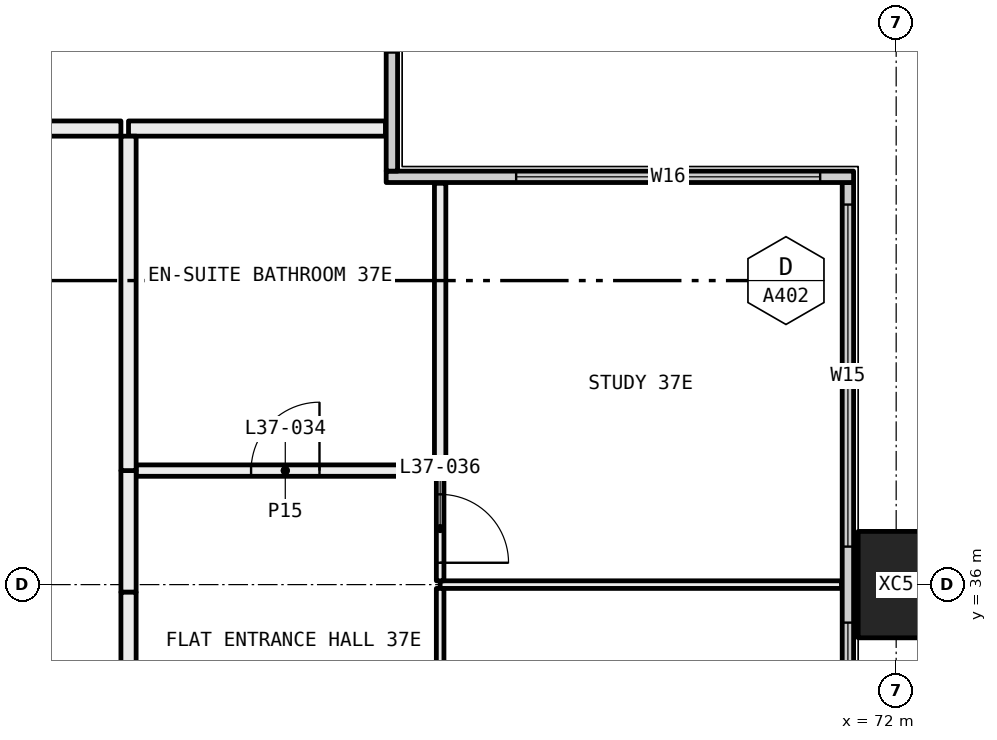
"""IFC4 building model, lengths in metres.
Left out: names, types, materials, properties, quantities, classifications, styles, units other than length and angle.
Written with IfcOpenShell. Run it as: python <this file> out.ifc"""

import sys

from ifc_helpers import new_model, si_unit, direction, frame, frame_2d, origin, origin_2d, place, context, subcontext, project, spatial, rectangle, hollow_rectangle, extrude, element, fill, save


model = new_model("IFC4")
c1 = context("Model", 3, precision=1e-05, world=origin(), true_north=direction((0.0, 1.0)))
c2 = subcontext(c1, "Body", "Model", "MODEL_VIEW")
j1 = project(units=[si_unit("LENGTHUNIT", "METRE"), si_unit("PLANEANGLEUNIT", "RADIAN")], contexts=[c1])
p1 = place(None, origin())
s1 = spatial("IfcSite", under=j1, at=p1, CompositionType="ELEMENT")
p2 = place(p1, origin())
s2 = spatial("IfcBuilding", under=s1, at=p2, CompositionType="ELEMENT")
p3 = place(p2, frame((0.0, 0.0, 141.45)))
s3 = spatial("IfcBuildingStorey", under=s2, at=p3, CompositionType="ELEMENT", Elevation=141.45)
p4 = place(p3, frame((72.0, 36.0, -0.4), z_axis=(0.0, 0.0, 1.0), x_axis=(0.0, 1.0, 0.0)))
e1 = element("IfcColumn", 1, at=p4, inside=s3, PredefinedType="COLUMN", context=c2, shape_type="SweptSolid", body=[
    extrude(hollow_rectangle(XDim=1.4, YDim=1.0, WallThickness=0.055, at=origin_2d()), origin(), (0.0, 0.0, 1.0), 3.45),
])
p5 = place(p3, frame((71.365, 18.71, 0.0), z_axis=(0.0, 0.0, 1.0), x_axis=(0.0, 1.0, 0.0)))
e2 = element("IfcWall", 2, at=p5, inside=s3, PredefinedType="ELEMENTEDWALL", context=c2, shape_type="SweptSolid", body=[
    extrude(rectangle(XDim=22.58, YDim=0.15, at=frame_2d((11.29, 0.0))), origin(), (0.0, 0.0, 1.0), 3.05),
])
p6 = place(p5, frame((0.29, 0.0, 0.45)))
e3 = element("IfcOpeningElement", 3, at=p6, cuts=e2, PredefinedType="OPENING", context=c2, shape_type="SweptSolid", body=[
    extrude(rectangle(XDim=4.5, YDim=2.55, at=frame_2d((2.25, 1.275))), frame((0.0, 0.085, 0.0), z_axis=(0.0, -1.0, 0.0), x_axis=(1.0, 0.0, 0.0)), (0.0, 0.0, 1.0), 0.17),
])
p7 = place(p5, frame((5.79, 0.0, 0.45)))
e4 = element("IfcOpeningElement", 4, at=p7, cuts=e2, PredefinedType="OPENING", context=c2, shape_type="SweptSolid", body=[
    extrude(rectangle(XDim=3.75, YDim=2.55, at=frame_2d((1.875, 1.275))), frame((0.0, 0.085, 0.0), z_axis=(0.0, -1.0, 0.0), x_axis=(1.0, 0.0, 0.0)), (0.0, 0.0, 1.0), 0.17),
])
p8 = place(p5, frame((13.04, 0.0, 0.45)))
e5 = element("IfcOpeningElement", 5, at=p8, cuts=e2, PredefinedType="OPENING", context=c2, shape_type="SweptSolid", body=[
    extrude(rectangle(XDim=0.75, YDim=2.55, at=frame_2d((0.375, 1.275))), frame((0.0, 0.085, 0.0), z_axis=(0.0, -1.0, 0.0), x_axis=(1.0, 0.0, 0.0)), (0.0, 0.0, 1.0), 0.17),
])
p9 = place(p5, frame((14.79, 0.0, 0.45)))
e6 = element("IfcOpeningElement", 6, at=p9, cuts=e2, PredefinedType="OPENING", context=c2, shape_type="SweptSolid", body=[
    extrude(rectangle(XDim=2.0, YDim=2.55, at=frame_2d((1.0, 1.275))), frame((0.0, 0.085, 0.0), z_axis=(0.0, -1.0, 0.0), x_axis=(1.0, 0.0, 0.0)), (0.0, 0.0, 1.0), 0.17),
])
p10 = place(p5, frame((17.79, 0.0, 0.45)))
e7 = element("IfcOpeningElement", 7, at=p10, cuts=e2, PredefinedType="OPENING", context=c2, shape_type="SweptSolid", body=[
    extrude(rectangle(XDim=4.5, YDim=2.55, at=frame_2d((2.25, 1.275))), frame((0.0, 0.085, 0.0), z_axis=(0.0, -1.0, 0.0), x_axis=(1.0, 0.0, 0.0)), (0.0, 0.0, 1.0), 0.17),
])
p11 = place(p3, frame((65.29, 41.365, 0.0), z_axis=(0.0, 0.0, 1.0), x_axis=(1.0, 0.0, 0.0)))
e8 = element("IfcWall", 8, at=p11, inside=s3, PredefinedType="ELEMENTEDWALL", context=c2, shape_type="SweptSolid", body=[
    extrude(rectangle(XDim=6.15, YDim=0.15, at=frame_2d((3.075, 0.0))), origin(), (0.0, 0.0, 1.0), 3.05),
])
p12 = place(p11, frame((1.71, 0.0, 0.45)))
e9 = element("IfcOpeningElement", 9, at=p12, cuts=e8, PredefinedType="OPENING", context=c2, shape_type="SweptSolid", body=[
    extrude(rectangle(XDim=4.0, YDim=2.55, at=frame_2d((2.0, 1.275))), frame((0.0, 0.085, 0.0), z_axis=(0.0, -1.0, 0.0), x_axis=(1.0, 0.0, 0.0)), (0.0, 0.0, 1.0), 0.17),
])
p13 = place(p3, frame((65.365, 41.44, 0.0), z_axis=(0.0, 0.0, 1.0), x_axis=(0.0, 1.0, 0.0)))
e10 = element("IfcWall", 10, at=p13, inside=s3, PredefinedType="ELEMENTEDWALL", context=c2, shape_type="SweptSolid", body=[
    extrude(rectangle(XDim=5.85, YDim=0.15, at=frame_2d((2.925, 0.0))), origin(), (0.0, 0.0, 1.0), 3.05),
])
p14 = place(p13, frame((1.56, 0.0, 0.45)))
e11 = element("IfcOpeningElement", 11, at=p14, cuts=e10, PredefinedType="OPENING", context=c2, shape_type="SweptSolid", body=[
    extrude(rectangle(XDim=4.0, YDim=2.55, at=frame_2d((2.0, 1.275))), frame((0.0, 0.085, 0.0), z_axis=(0.0, -1.0, 0.0), x_axis=(1.0, 0.0, 0.0)), (0.0, 0.0, 1.0), 0.17),
])
p15 = place(p3, frame((71.28, 36.0, 0.0), z_axis=(0.0, 0.0, 1.0), x_axis=(-1.0, 0.0, 0.0)))
e12 = element("IfcWall", 12, at=p15, inside=s3, PredefinedType="PARTITIONING", context=c2, shape_type="SweptSolid", body=[
    extrude(rectangle(XDim=5.28, YDim=0.1, at=frame_2d((2.64, 0.0))), origin(), (0.0, 0.0, 1.0), 2.45),
])
p16 = place(p3, frame((66.0, 35.95, 0.0), z_axis=(0.0, 0.0, 1.0), x_axis=(0.0, -1.0, 0.0)))
e13 = element("IfcWall", 13, at=p16, inside=s3, PredefinedType="PARTITIONING", context=c2, shape_type="SweptSolid", body=[
    extrude(rectangle(XDim=2.95, YDim=0.1, at=frame_2d((1.475, 0.0))), origin(), (0.0, 0.0, 1.0), 2.45),
])
p17 = place(p3, frame((66.0, 37.425, 0.0), z_axis=(0.0, 0.0, 1.0), x_axis=(0.0, -1.0, 0.0)))
e14 = element("IfcWall", 14, at=p17, inside=s3, PredefinedType="PARTITIONING", context=c2, shape_type="SweptSolid", body=[
    extrude(rectangle(XDim=1.375, YDim=0.1, at=frame_2d((0.688, 0.0))), origin(), (0.0, 0.0, 1.0), 2.45),
])
p18 = place(p17, frame((0.238, 0.0, 0.0)))
e15 = element("IfcOpeningElement", 15, at=p18, cuts=e14, PredefinedType="OPENING", context=c2, shape_type="SweptSolid", body=[
    extrude(rectangle(XDim=0.9, YDim=2.1, at=frame_2d((0.45, 1.05))), frame((0.0, 0.06, 0.0), z_axis=(0.0, -1.0, 0.0), x_axis=(1.0, 0.0, 0.0)), (0.0, 0.0, 1.0), 0.12),
])
p19 = place(p3, frame((66.0, 41.28, 0.0), z_axis=(0.0, 0.0, 1.0), x_axis=(0.0, -1.0, 0.0)))
e16 = element("IfcWall", 16, at=p19, inside=s3, PredefinedType="PARTITIONING", context=c2, shape_type="SweptSolid", body=[
    extrude(rectangle(XDim=3.78, YDim=0.15, at=frame_2d((1.89, 0.0))), origin(), (0.0, 0.0, 1.0), 3.05),
])
p20 = place(p3, frame((65.925, 37.5, 0.0), z_axis=(0.0, 0.0, 1.0), x_axis=(-1.0, 0.0, 0.0)))
e17 = element("IfcWall", 17, at=p20, inside=s3, PredefinedType="PARTITIONING", context=c2, shape_type="SweptSolid", body=[
    extrude(rectangle(XDim=3.925, YDim=0.15, at=frame_2d((1.962, 0.0))), origin(), (0.0, 0.0, 1.0), 3.05),
])
p21 = place(p20, frame((1.512, 0.0, 0.0)))
e18 = element("IfcOpeningElement", 18, at=p21, cuts=e17, PredefinedType="OPENING", context=c2, shape_type="SweptSolid", body=[
    extrude(rectangle(XDim=0.9, YDim=2.1, at=frame_2d((0.45, 1.05))), frame((0.0, 0.085, 0.0), z_axis=(0.0, -1.0, 0.0), x_axis=(1.0, 0.0, 0.0)), (0.0, 0.0, 1.0), 0.17),
])
p22 = place(p3, frame((61.9, 37.5, 0.0), z_axis=(0.0, 0.0, 1.0), x_axis=(0.0, -1.0, 0.0)))
e19 = element("IfcWall", 19, at=p22, inside=s3, PredefinedType="PARTITIONING", context=c2, shape_type="SweptSolid", body=[
    extrude(rectangle(XDim=1.6, YDim=0.2, at=frame_2d((0.8, 0.0))), origin(), (0.0, 0.0, 1.0), 2.45),
])
p23 = place(p3, frame((61.9, 35.9, 0.0), z_axis=(0.0, 0.0, 1.0), x_axis=(0.0, -1.0, 0.0)))
e20 = element("IfcWall", 20, at=p23, inside=s3, PredefinedType="PARTITIONING", context=c2, shape_type="SweptSolid", body=[
    extrude(rectangle(XDim=2.9, YDim=0.2, at=frame_2d((1.45, 0.0))), origin(), (0.0, 0.0, 1.0), 3.05),
])
p24 = place(p23, frame((0.95, 0.0, 0.0)))
e21 = element("IfcOpeningElement", 21, at=p24, cuts=e20, PredefinedType="OPENING", context=c2, shape_type="SweptSolid", body=[
    extrude(rectangle(XDim=1.0, YDim=2.1, at=frame_2d((0.5, 1.05))), frame((0.0, 0.11, 0.0), z_axis=(0.0, -1.0, 0.0), x_axis=(1.0, 0.0, 0.0)), (0.0, 0.0, 1.0), 0.22),
])
p25 = place(p3, frame((65.28, 42.0, 0.0), z_axis=(0.0, 0.0, 1.0), x_axis=(-1.0, 0.0, 0.0)))
e22 = element("IfcWall", 22, at=p25, inside=s3, PredefinedType="PARTITIONING", context=c2, shape_type="SweptSolid", body=[
    extrude(rectangle(XDim=3.38, YDim=0.2, at=frame_2d((1.69, 0.0))), origin(), (0.0, 0.0, 1.0), 3.05),
])
p26 = place(p3, frame((61.9, 41.9, 0.0), z_axis=(0.0, 0.0, 1.0), x_axis=(0.0, -1.0, 0.0)))
e23 = element("IfcWall", 23, at=p26, inside=s3, PredefinedType="PARTITIONING", context=c2, shape_type="SweptSolid", body=[
    extrude(rectangle(XDim=4.4, YDim=0.2, at=frame_2d((2.2, 0.0))), origin(), (0.0, 0.0, 1.0), 3.05),
])
p27 = place(p3, frame((60.0, 42.0, 0.0), z_axis=(0.0, 0.0, 1.0), x_axis=(1.0, 0.0, 0.0)))
e24 = element("IfcWall", 24, at=p27, inside=s3, PredefinedType="PARTITIONING", context=c2, shape_type="SweptSolid", body=[
    extrude(rectangle(XDim=1.8, YDim=0.2, at=frame_2d((0.9, 0.0))), origin(), (0.0, 0.0, 1.0), 3.05),
])
p28 = place(p9, origin())
e25 = element("IfcWindow", 25, at=p28, inside=s3, PartitioningType="SINGLE_PANEL", PredefinedType="WINDOW", context=c2, shape_type="SweptSolid", body=[
    extrude(rectangle(XDim=2.0, YDim=2.55, at=frame_2d((1.0, 1.275))), frame((0.0, 0.03, 0.0), z_axis=(0.0, -1.0, 0.0), x_axis=(1.0, 0.0, 0.0)), (0.0, 0.0, 1.0), 0.06),
])
fill(e6, e25)
p29 = place(p10, origin())
e26 = element("IfcWindow", 26, at=p29, inside=s3, PartitioningType="SINGLE_PANEL", PredefinedType="WINDOW", context=c2, shape_type="SweptSolid", body=[
    extrude(rectangle(XDim=4.5, YDim=2.55, at=frame_2d((2.25, 1.275))), frame((0.0, 0.03, 0.0), z_axis=(0.0, -1.0, 0.0), x_axis=(1.0, 0.0, 0.0)), (0.0, 0.0, 1.0), 0.06),
])
fill(e7, e26)
p30 = place(p12, origin())
e27 = element("IfcWindow", 27, at=p30, inside=s3, PartitioningType="SINGLE_PANEL", PredefinedType="WINDOW", context=c2, shape_type="SweptSolid", body=[
    extrude(rectangle(XDim=4.0, YDim=2.55, at=frame_2d((2.0, 1.275))), frame((0.0, 0.03, 0.0), z_axis=(0.0, -1.0, 0.0), x_axis=(1.0, 0.0, 0.0)), (0.0, 0.0, 1.0), 0.06),
])
fill(e9, e27)
p31 = place(p21, frame((0.9, 0.0, 0.0), x_axis=(-1.0, 0.0, 0.0)))
e28 = element("IfcDoor", 28, at=p31, inside=s3, OperationType="SINGLE_SWING_LEFT", PredefinedType="DOOR", context=c2, shape_type="SweptSolid", body=[
    extrude(rectangle(XDim=0.9, YDim=2.1, at=frame_2d((0.45, 1.05))), frame((0.0, 0.025, 0.0), z_axis=(0.0, -1.0, 0.0), x_axis=(1.0, 0.0, 0.0)), (0.0, 0.0, 1.0), 0.05),
])
fill(e18, e28)
p32 = place(p18, origin())
e29 = element("IfcDoor", 29, at=p32, inside=s3, OperationType="SINGLE_SWING_LEFT", PredefinedType="DOOR", context=c2, shape_type="SweptSolid", body=[
    extrude(rectangle(XDim=0.9, YDim=2.1, at=frame_2d((0.45, 1.05))), frame((0.0, 0.025, 0.0), z_axis=(0.0, -1.0, 0.0), x_axis=(1.0, 0.0, 0.0)), (0.0, 0.0, 1.0), 0.05),
])
fill(e15, e29)
save(model, sys.argv[1])
